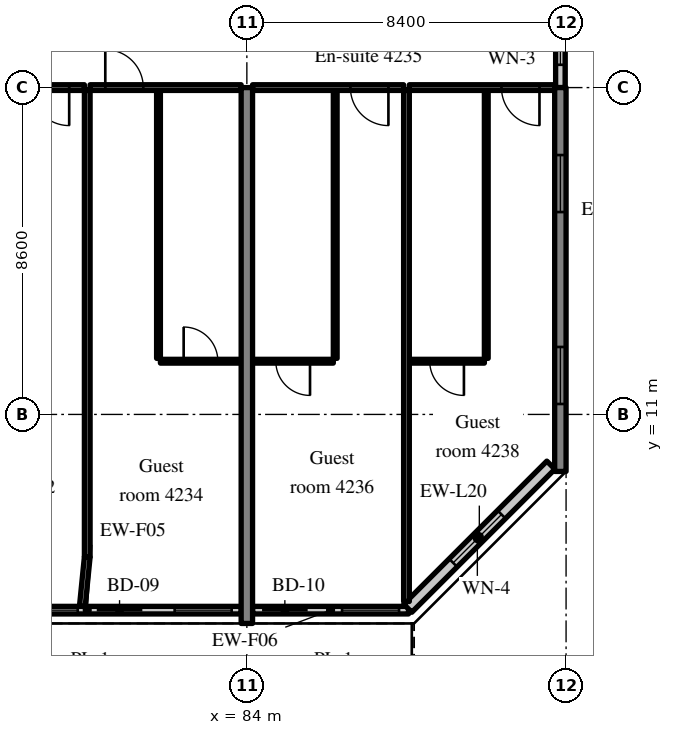
"""IFC4 building model, lengths in metres.
Left out: names, types, materials, properties, quantities, classifications, styles, units other than length and angle.
Written with IfcOpenShell. Run it as: python <this file> out.ifc"""

import sys

from ifc_helpers import new_model, si_unit, direction, frame, frame_2d, origin, place, context, subcontext, project, spatial, rectangle, extrude, source, transform, mapped, element, fill, save


model = new_model("IFC4")
c1 = context("Model", 3, precision=1e-05, world=origin(), true_north=direction((0.0, 1.0)))
c2 = subcontext(c1, "Body", "Model", "MODEL_VIEW")
j1 = project(units=[si_unit("LENGTHUNIT", "METRE"), si_unit("PLANEANGLEUNIT", "RADIAN")], contexts=[c1])
p1 = place(None, origin())
s1 = spatial("IfcSite", under=j1, at=p1, CompositionType="ELEMENT")
p2 = place(p1, origin())
s2 = spatial("IfcBuilding", under=s1, at=p2, CompositionType="ELEMENT")
p3 = place(p2, frame((0.0, 0.0, 174.4)))
s3 = spatial("IfcBuildingStorey", under=s2, at=p3, CompositionType="ELEMENT", Elevation=174.4)
m1 = source(origin(), c2, "Body", "SweptSolid", [
    extrude(rectangle(XDim=14.1, YDim=0.3, at=frame_2d((7.05, 0.0))), origin(), (0.0, 0.0, 1.0), 3.52),
])
p4 = place(p3, frame((84.0, 5.5, 0.0), z_axis=(0.0, 0.0, 1.0), x_axis=(0.0, 1.0, 0.0)))
e1 = element("IfcWall", 1, at=p4, inside=s3, PredefinedType="SHEAR", context=c2, shape_type="MappedRepresentation", body=[
    mapped(m1, transform((0.0, 0.0, 0.0), scale=1.0)),
])
m2 = source(origin(), c2, "Body", "SweptSolid", [
    extrude(rectangle(XDim=10.1, YDim=0.3, at=frame_2d((5.05, 0.0))), origin(), (0.0, 0.0, 1.0), 3.52),
])
p5 = place(p3, frame((92.25, 9.5, 0.0), z_axis=(0.0, 0.0, 1.0), x_axis=(0.0, 1.0, 0.0)))
e2 = element("IfcWall", 2, at=p5, inside=s3, PredefinedType="SHEAR", context=c2, shape_type="MappedRepresentation", body=[
    mapped(m2, transform((0.0, 0.0, 0.0), scale=1.0)),
])
m3 = source(origin(), c2, "Body", "SweptSolid", [
    extrude(rectangle(XDim=1.5, YDim=1.5, at=frame_2d((0.75, 0.75))), frame((0.0, 0.16, 0.0), z_axis=(0.0, -1.0, 0.0), x_axis=(1.0, 0.0, 0.0)), (0.0, 0.0, 1.0), 0.32),
])
p6 = place(p5, frame((1.775, 0.0, 0.9)))
e3 = element("IfcOpeningElement", 3, at=p6, cuts=e2, PredefinedType="OPENING", context=c2, shape_type="MappedRepresentation", body=[
    mapped(m3, transform((0.0, 0.0, 0.0), scale=1.0)),
])
p7 = place(p5, frame((6.825, 0.0, 0.9)))
e4 = element("IfcOpeningElement", 4, at=p7, cuts=e2, PredefinedType="OPENING", context=c2, shape_type="MappedRepresentation", body=[
    mapped(m3, transform((0.0, 0.0, 0.0), scale=1.0)),
])
m4 = source(origin(), c2, "Body", "SweptSolid", [
    extrude(rectangle(XDim=8.1, YDim=0.2, at=frame_2d((4.05, 0.0))), origin(), (0.0, 0.0, 1.0), 2.87),
])
p8 = place(p3, frame((75.75, 5.85, 0.0), z_axis=(0.0, 0.0, 1.0), x_axis=(1.0, 0.0, 0.0)))
e5 = element("IfcWall", 5, at=p8, inside=s3, PredefinedType="SOLIDWALL", context=c2, shape_type="MappedRepresentation", body=[
    mapped(m4, transform((0.0, 0.0, 0.0), scale=1.0)),
])
m5 = source(origin(), c2, "Body", "SweptSolid", [
    extrude(rectangle(XDim=1.2, YDim=2.4, at=frame_2d((0.6, 1.2))), frame((0.0, 0.11, 0.0), z_axis=(0.0, -1.0, 0.0), x_axis=(1.0, 0.0, 0.0)), (0.0, 0.0, 1.0), 0.22),
])
p9 = place(p8, frame((0.25, 0.0, 0.0)))
e6 = element("IfcOpeningElement", 6, at=p9, cuts=e5, PredefinedType="OPENING", context=c2, shape_type="MappedRepresentation", body=[
    mapped(m5, transform((0.0, 0.0, 0.0), scale=1.0)),
])
m6 = source(origin(), c2, "Body", "SweptSolid", [
    extrude(rectangle(XDim=1.5, YDim=1.5, at=frame_2d((0.75, 0.75))), frame((0.0, 0.11, 0.0), z_axis=(0.0, -1.0, 0.0), x_axis=(1.0, 0.0, 0.0)), (0.0, 0.0, 1.0), 0.22),
])
p10 = place(p8, frame((2.3, 0.0, 0.9)))
e7 = element("IfcOpeningElement", 7, at=p10, cuts=e5, PredefinedType="OPENING", context=c2, shape_type="MappedRepresentation", body=[
    mapped(m6, transform((0.0, 0.0, 0.0), scale=1.0)),
])
p11 = place(p8, frame((4.3, 0.0, 0.0)))
e8 = element("IfcOpeningElement", 8, at=p11, cuts=e5, PredefinedType="OPENING", context=c2, shape_type="MappedRepresentation", body=[
    mapped(m5, transform((0.0, 0.0, 0.0), scale=1.0)),
])
p12 = place(p8, frame((6.35, 0.0, 0.9)))
e9 = element("IfcOpeningElement", 9, at=p12, cuts=e5, PredefinedType="OPENING", context=c2, shape_type="MappedRepresentation", body=[
    mapped(m6, transform((0.0, 0.0, 0.0), scale=1.0)),
])
m7 = source(origin(), c2, "Body", "SweptSolid", [
    extrude(rectangle(XDim=4.105, YDim=0.2, at=frame_2d((2.052, 0.0))), origin(), (0.0, 0.0, 1.0), 2.87),
])
p13 = place(p3, frame((84.15, 5.85, 0.0), z_axis=(0.0, 0.0, 1.0), x_axis=(1.0, 0.0, 0.0)))
e10 = element("IfcWall", 10, at=p13, inside=s3, PredefinedType="SOLIDWALL", context=c2, shape_type="MappedRepresentation", body=[
    mapped(m7, transform((0.0, 0.0, 0.0), scale=1.0)),
])
p14 = place(p13, frame((0.25, 0.0, 0.0)))
e11 = element("IfcOpeningElement", 11, at=p14, cuts=e10, PredefinedType="OPENING", context=c2, shape_type="MappedRepresentation", body=[
    mapped(m5, transform((0.0, 0.0, 0.0), scale=1.0)),
])
p15 = place(p13, frame((2.355, 0.0, 0.9)))
e12 = element("IfcOpeningElement", 12, at=p15, cuts=e10, PredefinedType="OPENING", context=c2, shape_type="MappedRepresentation", body=[
    mapped(m6, transform((0.0, 0.0, 0.0), scale=1.0)),
])
m8 = source(origin(), c2, "Body", "SweptSolid", [
    extrude(rectangle(XDim=5.326, YDim=0.3, at=frame_2d((2.663, 0.0))), origin(), (0.0, 0.0, 1.0), 3.52),
])
p16 = place(p3, frame((88.234, 5.9, 0.0), z_axis=(0.0, 0.0, 1.0), x_axis=(0.707083859269, 0.707129702361, 0.0)))
e13 = element("IfcWall", 13, at=p16, inside=s3, PredefinedType="SOLIDWALL", context=c2, shape_type="MappedRepresentation", body=[
    mapped(m8, transform((0.0, 0.0, 0.0), scale=1.0)),
])
m9 = source(origin(), c2, "Body", "SweptSolid", [
    extrude(rectangle(XDim=1.8, YDim=1.5, at=frame_2d((0.9, 0.75))), frame((0.0, 0.16, 0.0), z_axis=(0.0, -1.0, 0.0), x_axis=(1.0, 0.0, 0.0)), (0.0, 0.0, 1.0), 0.32),
])
p17 = place(p16, frame((1.689, 0.0, 0.9)))
e14 = element("IfcOpeningElement", 14, at=p17, cuts=e13, PredefinedType="OPENING", context=c2, shape_type="MappedRepresentation", body=[
    mapped(m9, transform((0.0, 0.0, 0.0), scale=1.0)),
])
m10 = source(origin(), c2, "Body", "SweptSolid", [
    extrude(rectangle(XDim=2.4, YDim=0.25, at=frame_2d((1.2, 0.0))), origin(), (0.0, 0.0, 1.0), 2.62),
])
p18 = place(p3, frame((92.25, 19.6, 0.0), z_axis=(0.0, 0.0, 1.0), x_axis=(0.0, 1.0, 0.0)))
e15 = element("IfcWall", 15, at=p18, inside=s3, PredefinedType="SOLIDWALL", context=c2, shape_type="MappedRepresentation", body=[
    mapped(m10, transform((0.0, 0.0, 0.0), scale=1.0)),
])
m11 = source(origin(), c2, "Body", "SweptSolid", [
    extrude(rectangle(XDim=1.2, YDim=1.5, at=frame_2d((0.6, 0.75))), frame((0.0, 0.135, 0.0), z_axis=(0.0, -1.0, 0.0), x_axis=(1.0, 0.0, 0.0)), (0.0, 0.0, 1.0), 0.27),
])
p19 = place(p18, frame((0.6, 0.0, 0.9)))
e16 = element("IfcOpeningElement", 16, at=p19, cuts=e15, PredefinedType="OPENING", context=c2, shape_type="MappedRepresentation", body=[
    mapped(m11, transform((0.0, 0.0, 0.0), scale=1.0)),
])
m12 = source(origin(), c2, "Body", "SweptSolid", [
    extrude(rectangle(XDim=3.975, YDim=0.15, at=frame_2d((1.988, 0.0))), origin(), (0.0, 0.0, 1.0), 2.82),
])
p20 = place(p3, frame((75.75, 19.6, 0.0), z_axis=(0.0, 0.0, 1.0), x_axis=(1.0, 0.0, 0.0)))
e17 = element("IfcWall", 17, at=p20, inside=s3, PredefinedType="PARTITIONING", context=c2, shape_type="MappedRepresentation", body=[
    mapped(m12, transform((0.0, 0.0, 0.0), scale=1.0)),
])
m13 = source(origin(), c2, "Body", "SweptSolid", [
    extrude(rectangle(XDim=1.0, YDim=2.1, at=frame_2d((0.5, 1.05))), frame((0.0, 0.085, 0.0), z_axis=(0.0, -1.0, 0.0), x_axis=(1.0, 0.0, 0.0)), (0.0, 0.0, 1.0), 0.17),
])
p21 = place(p20, frame((2.575, 0.0, 0.0)))
e18 = element("IfcOpeningElement", 18, at=p21, cuts=e17, PredefinedType="OPENING", context=c2, shape_type="MappedRepresentation", body=[
    mapped(m13, transform((0.0, 0.0, 0.0), scale=1.0)),
])
m14 = source(origin(), c2, "Body", "SweptSolid", [
    extrude(rectangle(XDim=7.05, YDim=0.1, at=frame_2d((3.525, 0.0))), origin(), (0.0, 0.0, 1.0), 3.52),
])
p22 = place(p3, frame((81.675, 12.475, 0.0), z_axis=(0.0, 0.0, 1.0), x_axis=(0.0, 1.0, 0.0)))
e19 = element("IfcWall", 19, at=p22, inside=s3, PredefinedType="PARTITIONING", context=c2, shape_type="MappedRepresentation", body=[
    mapped(m14, transform((0.0, 0.0, 0.0), scale=1.0)),
])
m15 = source(origin(), c2, "Body", "SweptSolid", [
    extrude(rectangle(XDim=2.125, YDim=0.1, at=frame_2d((1.062, 0.0))), origin(), (0.0, 0.0, 1.0), 3.52),
])
p23 = place(p3, frame((81.725, 12.4, 0.0), z_axis=(0.0, 0.0, 1.0), x_axis=(1.0, 0.0, 0.0)))
e20 = element("IfcWall", 20, at=p23, inside=s3, PredefinedType="PARTITIONING", context=c2, shape_type="MappedRepresentation", body=[
    mapped(m15, transform((0.0, 0.0, 0.0), scale=1.0)),
])
m16 = source(origin(), c2, "Body", "SweptSolid", [
    extrude(rectangle(XDim=0.9, YDim=2.1, at=frame_2d((0.45, 1.05))), frame((0.0, 0.06, 0.0), z_axis=(0.0, -1.0, 0.0), x_axis=(1.0, 0.0, 0.0)), (0.0, 0.0, 1.0), 0.12),
])
p24 = place(p23, frame((0.612, 0.0, 0.0)))
e21 = element("IfcOpeningElement", 21, at=p24, cuts=e20, PredefinedType="OPENING", context=c2, shape_type="MappedRepresentation", body=[
    mapped(m16, transform((0.0, 0.0, 0.0), scale=1.0)),
])
p25 = place(p3, frame((79.875, 19.6, 0.0), z_axis=(0.0, 0.0, 1.0), x_axis=(1.0, 0.0, 0.0)))
e22 = element("IfcWall", 22, at=p25, inside=s3, PredefinedType="PARTITIONING", context=c2, shape_type="MappedRepresentation", body=[
    mapped(m12, transform((0.0, 0.0, 0.0), scale=1.0)),
])
p26 = place(p25, frame((0.4, 0.0, 0.0)))
e23 = element("IfcOpeningElement", 23, at=p26, cuts=e22, PredefinedType="OPENING", context=c2, shape_type="MappedRepresentation", body=[
    mapped(m13, transform((0.0, 0.0, 0.0), scale=1.0)),
])
m17 = source(origin(), c2, "Body", "SweptSolid", [
    extrude(rectangle(XDim=12.275, YDim=0.15, at=frame_2d((6.137, 0.0))), origin(), (0.0, 0.0, 1.0), 3.52),
])
p27 = place(p3, frame((79.8, 7.25, 0.0), z_axis=(0.0, 0.0, 1.0), x_axis=(0.0, 1.0, 0.0)))
e24 = element("IfcWall", 24, at=p27, inside=s3, PredefinedType="PARTITIONING", context=c2, shape_type="MappedRepresentation", body=[
    mapped(m17, transform((0.0, 0.0, 0.0), scale=1.0)),
])
p28 = place(p3, frame((86.325, 12.475, 0.0), z_axis=(0.0, 0.0, 1.0), x_axis=(0.0, 1.0, 0.0)))
e25 = element("IfcWall", 25, at=p28, inside=s3, PredefinedType="PARTITIONING", context=c2, shape_type="MappedRepresentation", body=[
    mapped(m14, transform((0.0, 0.0, 0.0), scale=1.0)),
])
p29 = place(p3, frame((84.15, 12.4, 0.0), z_axis=(0.0, 0.0, 1.0), x_axis=(1.0, 0.0, 0.0)))
e26 = element("IfcWall", 26, at=p29, inside=s3, PredefinedType="PARTITIONING", context=c2, shape_type="MappedRepresentation", body=[
    mapped(m15, transform((0.0, 0.0, 0.0), scale=1.0)),
])
p30 = place(p29, frame((0.612, 0.0, 0.0)))
e27 = element("IfcOpeningElement", 27, at=p30, cuts=e26, PredefinedType="OPENING", context=c2, shape_type="MappedRepresentation", body=[
    mapped(m16, transform((0.0, 0.0, 0.0), scale=1.0)),
])
p31 = place(p3, frame((84.15, 19.6, 0.0), z_axis=(0.0, 0.0, 1.0), x_axis=(1.0, 0.0, 0.0)))
e28 = element("IfcWall", 28, at=p31, inside=s3, PredefinedType="PARTITIONING", context=c2, shape_type="MappedRepresentation", body=[
    mapped(m12, transform((0.0, 0.0, 0.0), scale=1.0)),
])
p32 = place(p31, frame((2.575, 0.0, 0.0)))
e29 = element("IfcOpeningElement", 29, at=p32, cuts=e28, PredefinedType="OPENING", context=c2, shape_type="MappedRepresentation", body=[
    mapped(m13, transform((0.0, 0.0, 0.0), scale=1.0)),
])
p33 = place(p3, frame((90.3, 12.475, 0.0), z_axis=(0.0, 0.0, 1.0), x_axis=(0.0, 1.0, 0.0)))
e30 = element("IfcWall", 30, at=p33, inside=s3, PredefinedType="PARTITIONING", context=c2, shape_type="MappedRepresentation", body=[
    mapped(m14, transform((0.0, 0.0, 0.0), scale=1.0)),
])
m18 = source(origin(), c2, "Body", "SweptSolid", [
    extrude(rectangle(XDim=1.975, YDim=0.1, at=frame_2d((0.988, 0.0))), origin(), (0.0, 0.0, 1.0), 3.52),
])
p34 = place(p3, frame((88.275, 12.4, 0.0), z_axis=(0.0, 0.0, 1.0), x_axis=(1.0, 0.0, 0.0)))
e31 = element("IfcWall", 31, at=p34, inside=s3, PredefinedType="PARTITIONING", context=c2, shape_type="MappedRepresentation", body=[
    mapped(m18, transform((0.0, 0.0, 0.0), scale=1.0)),
])
p35 = place(p34, frame((0.537, 0.0, 0.0)))
e32 = element("IfcOpeningElement", 32, at=p35, cuts=e31, PredefinedType="OPENING", context=c2, shape_type="MappedRepresentation", body=[
    mapped(m16, transform((0.0, 0.0, 0.0), scale=1.0)),
])
m19 = source(origin(), c2, "Body", "SweptSolid", [
    extrude(rectangle(XDim=3.825, YDim=0.15, at=frame_2d((1.913, 0.0))), origin(), (0.0, 0.0, 1.0), 2.82),
])
p36 = place(p3, frame((88.275, 19.6, 0.0), z_axis=(0.0, 0.0, 1.0), x_axis=(1.0, 0.0, 0.0)))
e33 = element("IfcWall", 33, at=p36, inside=s3, PredefinedType="PARTITIONING", context=c2, shape_type="MappedRepresentation", body=[
    mapped(m19, transform((0.0, 0.0, 0.0), scale=1.0)),
])
p37 = place(p36, frame((2.425, 0.0, 0.0)))
e34 = element("IfcOpeningElement", 34, at=p37, cuts=e33, PredefinedType="OPENING", context=c2, shape_type="MappedRepresentation", body=[
    mapped(m13, transform((0.0, 0.0, 0.0), scale=1.0)),
])
m20 = source(origin(), c2, "Body", "SweptSolid", [
    extrude(rectangle(XDim=13.447, YDim=0.15, at=frame_2d((6.724, 0.0))), origin(), (0.0, 0.0, 1.0), 3.52),
])
p38 = place(p3, frame((88.2, 6.078, 0.0), z_axis=(0.0, 0.0, 1.0), x_axis=(0.0, 1.0, 0.0)))
e35 = element("IfcWall", 35, at=p38, inside=s3, PredefinedType="PARTITIONING", context=c2, shape_type="MappedRepresentation", body=[
    mapped(m20, transform((0.0, 0.0, 0.0), scale=1.0)),
])
m21 = source(origin(), c2, "Body", "SweptSolid", [
    extrude(rectangle(XDim=1.307, YDim=0.15, at=frame_2d((0.653, 0.0))), origin(), (0.0, 0.0, 1.0), 3.52),
])
p39 = place(p3, frame((79.67, 5.95, 0.0), z_axis=(0.0, 0.0, 1.0), x_axis=(0.099596223396, 0.99502793543, 0.0)))
e36 = element("IfcWall", 36, at=p39, inside=s3, PredefinedType="PARTITIONING", context=c2, shape_type="MappedRepresentation", body=[
    mapped(m21, transform((0.0, 0.0, 0.0), scale=1.0)),
])
m22 = source(origin(), c2, "Body", "SweptSolid", [
    extrude(rectangle(XDim=1.5, YDim=1.5, at=frame_2d((0.75, 0.75))), frame((0.0, 0.03, 0.0), z_axis=(0.0, -1.0, 0.0), x_axis=(1.0, 0.0, 0.0)), (0.0, 0.0, 1.0), 0.06),
])
p40 = place(p10, origin())
e37 = element("IfcWindow", 37, at=p40, inside=s3, PartitioningType="SINGLE_PANEL", PredefinedType="WINDOW", context=c2, shape_type="MappedRepresentation", body=[
    mapped(m22, transform((0.0, 0.0, 0.0), scale=1.0)),
])
fill(e7, e37)
m23 = source(origin(), c2, "Body", "SweptSolid", [
    extrude(rectangle(XDim=1.2, YDim=2.4, at=frame_2d((0.6, 1.2))), frame((0.0, 0.025, 0.0), z_axis=(0.0, -1.0, 0.0), x_axis=(1.0, 0.0, 0.0)), (0.0, 0.0, 1.0), 0.05),
])
p41 = place(p11, origin())
e38 = element("IfcDoor", 38, at=p41, inside=s3, OperationType="SLIDING_TO_LEFT", PredefinedType="DOOR", context=c2, shape_type="MappedRepresentation", body=[
    mapped(m23, transform((0.0, 0.0, 0.0), scale=1.0)),
])
fill(e8, e38)
p42 = place(p12, origin())
e39 = element("IfcWindow", 39, at=p42, inside=s3, PartitioningType="SINGLE_PANEL", PredefinedType="WINDOW", context=c2, shape_type="MappedRepresentation", body=[
    mapped(m22, transform((0.0, 0.0, 0.0), scale=1.0)),
])
fill(e9, e39)
p43 = place(p14, origin())
e40 = element("IfcDoor", 40, at=p43, inside=s3, OperationType="SLIDING_TO_RIGHT", PredefinedType="DOOR", context=c2, shape_type="MappedRepresentation", body=[
    mapped(m23, transform((0.0, 0.0, 0.0), scale=1.0)),
])
fill(e11, e40)
p44 = place(p15, origin())
e41 = element("IfcWindow", 41, at=p44, inside=s3, PartitioningType="SINGLE_PANEL", PredefinedType="WINDOW", context=c2, shape_type="MappedRepresentation", body=[
    mapped(m22, transform((0.0, 0.0, 0.0), scale=1.0)),
])
fill(e12, e41)
m24 = source(origin(), c2, "Body", "SweptSolid", [
    extrude(rectangle(XDim=1.8, YDim=1.5, at=frame_2d((0.9, 0.75))), frame((0.0, 0.03, 0.0), z_axis=(0.0, -1.0, 0.0), x_axis=(1.0, 0.0, 0.0)), (0.0, 0.0, 1.0), 0.06),
])
p45 = place(p17, origin())
e42 = element("IfcWindow", 42, at=p45, inside=s3, PartitioningType="SINGLE_PANEL", PredefinedType="WINDOW", context=c2, shape_type="MappedRepresentation", body=[
    mapped(m24, transform((0.0, 0.0, 0.0), scale=1.0)),
])
fill(e14, e42)
p46 = place(p6, origin())
e43 = element("IfcWindow", 43, at=p46, inside=s3, PartitioningType="SINGLE_PANEL", PredefinedType="WINDOW", context=c2, shape_type="MappedRepresentation", body=[
    mapped(m22, transform((0.0, 0.0, 0.0), scale=1.0)),
])
fill(e3, e43)
p47 = place(p7, origin())
e44 = element("IfcWindow", 44, at=p47, inside=s3, PartitioningType="SINGLE_PANEL", PredefinedType="WINDOW", context=c2, shape_type="MappedRepresentation", body=[
    mapped(m22, transform((0.0, 0.0, 0.0), scale=1.0)),
])
fill(e4, e44)
m25 = source(origin(), c2, "Body", "SweptSolid", [
    extrude(rectangle(XDim=1.2, YDim=1.5, at=frame_2d((0.6, 0.75))), frame((0.0, 0.03, 0.0), z_axis=(0.0, -1.0, 0.0), x_axis=(1.0, 0.0, 0.0)), (0.0, 0.0, 1.0), 0.06),
])
p48 = place(p19, origin())
e45 = element("IfcWindow", 45, at=p48, inside=s3, PartitioningType="SINGLE_PANEL", PredefinedType="WINDOW", context=c2, shape_type="MappedRepresentation", body=[
    mapped(m25, transform((0.0, 0.0, 0.0), scale=1.0)),
])
fill(e16, e45)
m26 = source(origin(), c2, "Body", "SweptSolid", [
    extrude(rectangle(XDim=1.0, YDim=2.1, at=frame_2d((0.5, 1.05))), frame((0.0, 0.025, 0.0), z_axis=(0.0, -1.0, 0.0), x_axis=(1.0, 0.0, 0.0)), (0.0, 0.0, 1.0), 0.05),
])
p49 = place(p21, origin())
e46 = element("IfcDoor", 46, at=p49, inside=s3, OperationType="SINGLE_SWING_RIGHT", PredefinedType="DOOR", context=c2, shape_type="MappedRepresentation", body=[
    mapped(m26, transform((0.0, 0.0, 0.0), scale=1.0)),
])
fill(e18, e46)
m27 = source(origin(), c2, "Body", "SweptSolid", [
    extrude(rectangle(XDim=0.9, YDim=2.1, at=frame_2d((0.45, 1.05))), frame((0.0, 0.025, 0.0), z_axis=(0.0, -1.0, 0.0), x_axis=(1.0, 0.0, 0.0)), (0.0, 0.0, 1.0), 0.05),
])
p50 = place(p24, origin())
e47 = element("IfcDoor", 47, at=p50, inside=s3, OperationType="SINGLE_SWING_LEFT", PredefinedType="DOOR", context=c2, shape_type="MappedRepresentation", body=[
    mapped(m27, transform((0.0, 0.0, 0.0), scale=1.0)),
])
fill(e21, e47)
p51 = place(p26, origin())
e48 = element("IfcDoor", 48, at=p51, inside=s3, OperationType="SINGLE_SWING_LEFT", PredefinedType="DOOR", context=c2, shape_type="MappedRepresentation", body=[
    mapped(m26, transform((0.0, 0.0, 0.0), scale=1.0)),
])
fill(e23, e48)
p52 = place(p30, origin())
e49 = element("IfcDoor", 49, at=p52, inside=s3, OperationType="SINGLE_SWING_RIGHT", PredefinedType="DOOR", context=c2, shape_type="MappedRepresentation", body=[
    mapped(m27, transform((0.0, 0.0, 0.0), scale=1.0)),
])
fill(e27, e49)
p53 = place(p32, origin())
e50 = element("IfcDoor", 50, at=p53, inside=s3, OperationType="SINGLE_SWING_RIGHT", PredefinedType="DOOR", context=c2, shape_type="MappedRepresentation", body=[
    mapped(m26, transform((0.0, 0.0, 0.0), scale=1.0)),
])
fill(e29, e50)
p54 = place(p35, origin())
e51 = element("IfcDoor", 51, at=p54, inside=s3, OperationType="SINGLE_SWING_RIGHT", PredefinedType="DOOR", context=c2, shape_type="MappedRepresentation", body=[
    mapped(m27, transform((0.0, 0.0, 0.0), scale=1.0)),
])
fill(e32, e51)
p55 = place(p37, origin())
e52 = element("IfcDoor", 52, at=p55, inside=s3, OperationType="SINGLE_SWING_RIGHT", PredefinedType="DOOR", context=c2, shape_type="MappedRepresentation", body=[
    mapped(m26, transform((0.0, 0.0, 0.0), scale=1.0)),
])
fill(e34, e52)
save(model, sys.argv[1])
